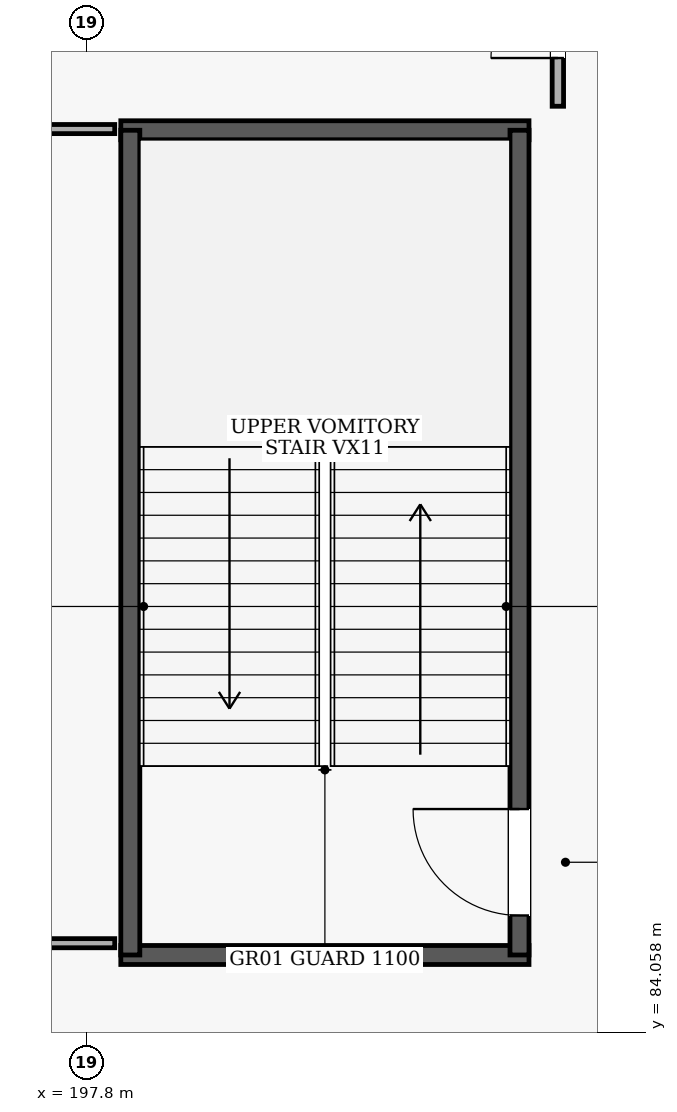
"""IFC4 building model, lengths in metres.
Left out: names, types, materials, properties, quantities, classifications, styles, units other than length and angle.
Written with IfcOpenShell. Run it as: python <this file> out.ifc"""

import sys

from ifc_helpers import new_model, si_unit, direction, frame, frame_2d, origin, place, context, subcontext, project, spatial, rectangle, extrude, element, fill, save


model = new_model("IFC4")
c1 = context("Model", 3, precision=1e-05, world=origin(), true_north=direction((0.0, 1.0)))
c2 = subcontext(c1, "Body", "Model", "MODEL_VIEW")
j1 = project(units=[si_unit("LENGTHUNIT", "METRE"), si_unit("PLANEANGLEUNIT", "RADIAN")], contexts=[c1])
p1 = place(None, origin())
s1 = spatial("IfcSite", under=j1, at=p1, CompositionType="ELEMENT")
p2 = place(p1, origin())
s2 = spatial("IfcBuilding", under=s1, at=p2, CompositionType="ELEMENT")
p3 = place(p2, frame((0.0, 0.0, 10.2)))
s3 = spatial("IfcBuildingStorey", under=s2, at=p3, CompositionType="ELEMENT", Elevation=10.2)
for number, where, z_axis, x_axis in (
    (1, (198.25, 85.075, 0.0), (0.0, 0.0, 1.0), (1.0, 0.0, 0.0)),
    (2, (203.62, 95.925, 0.0), (0.0, 0.0, 1.0), (-1.0, 0.0, 0.0)),
):
    element("IfcWall", number, at=place(p3, frame(where, z_axis=z_axis, x_axis=x_axis)), inside=s3, PredefinedType="SHEAR", context=c2, shape_type="SweptSolid", body=[
        extrude(rectangle(XDim=5.37, YDim=0.25, at=frame_2d((2.685, 0.0))), origin(), (0.0, 0.0, 1.0), 4.48),
    ])
p4 = place(p3, frame((198.375, 85.075, 0.0), z_axis=(0.0, 0.0, 1.0), x_axis=(0.0, 1.0, 0.0)))
e3 = element("IfcWall", 3, at=p4, inside=s3, PredefinedType="SHEAR", context=c2, shape_type="SweptSolid", body=[
    extrude(rectangle(XDim=10.85, YDim=0.25, at=frame_2d((5.425, 0.0))), origin(), (0.0, 0.0, 1.0), 4.48),
])
p5 = place(p3, frame((203.495, 85.075, 0.0), z_axis=(0.0, 0.0, 1.0), x_axis=(0.0, 1.0, 0.0)))
e4 = element("IfcWall", 4, at=p5, inside=s3, PredefinedType="SHEAR", context=c2, shape_type="SweptSolid", body=[
    extrude(rectangle(XDim=10.85, YDim=0.25, at=frame_2d((5.425, 0.0))), origin(), (0.0, 0.0, 1.0), 4.48),
])
p6 = place(p5, frame((0.52, 0.0, 0.0)))
e5 = element("IfcOpeningElement", 5, at=p6, cuts=e4, PredefinedType="OPENING", context=c2, shape_type="SweptSolid", body=[
    extrude(rectangle(XDim=1.4, YDim=2.15, at=frame_2d((0.7, 1.075))), frame((0.0, 0.135, 0.0), z_axis=(0.0, -1.0, 0.0), x_axis=(1.0, 0.0, 0.0)), (0.0, 0.0, 1.0), 0.27),
])
p7 = place(p3, frame((183.4, 85.23, 0.0), z_axis=(0.0, 0.0, 1.0), x_axis=(1.0, 0.0, 0.0)))
e6 = element("IfcWall", 6, at=p7, inside=s3, PredefinedType="PARTITIONING", context=c2, shape_type="SweptSolid", body=[
    extrude(rectangle(XDim=14.77, YDim=0.12, at=frame_2d((7.385, 0.0))), origin(), (0.0, 0.0, 1.0), 4.48),
])
p8 = place(p7, frame((6.545, 0.0, 0.0)))
e7 = element("IfcOpeningElement", 7, at=p8, cuts=e6, PredefinedType="OPENING", context=c2, shape_type="SweptSolid", body=[
    extrude(rectangle(XDim=1.68, YDim=2.25, at=frame_2d((0.84, 1.125))), frame((0.0, 0.07, 0.0), z_axis=(0.0, -1.0, 0.0), x_axis=(1.0, 0.0, 0.0)), (0.0, 0.0, 1.0), 0.14),
])
p9 = place(p3, frame((198.17, 95.941, 0.0), z_axis=(0.0, 0.0, 1.0), x_axis=(-1.0, 0.0, 0.0)))
e8 = element("IfcWall", 8, at=p9, inside=s3, PredefinedType="PARTITIONING", context=c2, shape_type="SweptSolid", body=[
    extrude(rectangle(XDim=14.77, YDim=0.12, at=frame_2d((7.385, 0.0))), origin(), (0.0, 0.0, 1.0), 4.48),
])
p10 = place(p3, frame((204.0, 96.241, 0.0), z_axis=(0.0, 0.0, 1.0), x_axis=(0.0, 1.0, 0.0)))
e9 = element("IfcWall", 9, at=p10, inside=s3, PredefinedType="PARTITIONING", context=c2, shape_type="SweptSolid", body=[
    extrude(rectangle(XDim=3.029, YDim=0.15, at=frame_2d((1.515, 0.0))), origin(), (0.0, 0.0, 1.0), 4.48),
])
p11 = place(p10, frame((0.635, 0.0, 0.0)))
e10 = element("IfcOpeningElement", 10, at=p11, cuts=e9, PredefinedType="OPENING", context=c2, shape_type="SweptSolid", body=[
    extrude(rectangle(XDim=1.76, YDim=2.25, at=frame_2d((0.88, 1.125))), frame((0.0, 0.085, 0.0), z_axis=(0.0, -1.0, 0.0), x_axis=(1.0, 0.0, 0.0)), (0.0, 0.0, 1.0), 0.17),
])
p12 = place(p6, origin())
e11 = element("IfcDoor", 11, at=p12, inside=s3, OperationType="SINGLE_SWING_RIGHT", PredefinedType="DOOR", context=c2, shape_type="SweptSolid", body=[
    extrude(rectangle(XDim=1.4, YDim=2.15, at=frame_2d((0.7, 1.075))), frame((0.0, 0.025, 0.0), z_axis=(0.0, -1.0, 0.0), x_axis=(1.0, 0.0, 0.0)), (0.0, 0.0, 1.0), 0.05),
])
fill(e5, e11)
p13 = place(p11, origin())
e12 = element("IfcDoor", 12, at=p13, inside=s3, OperationType="DOUBLE_DOOR_SINGLE_SWING", PredefinedType="DOOR", context=c2, shape_type="SweptSolid", body=[
    extrude(rectangle(XDim=1.76, YDim=2.25, at=frame_2d((0.88, 1.125))), frame((0.0, 0.025, 0.0), z_axis=(0.0, -1.0, 0.0), x_axis=(1.0, 0.0, 0.0)), (0.0, 0.0, 1.0), 0.05),
])
fill(e10, e12)
save(model, sys.argv[1])
